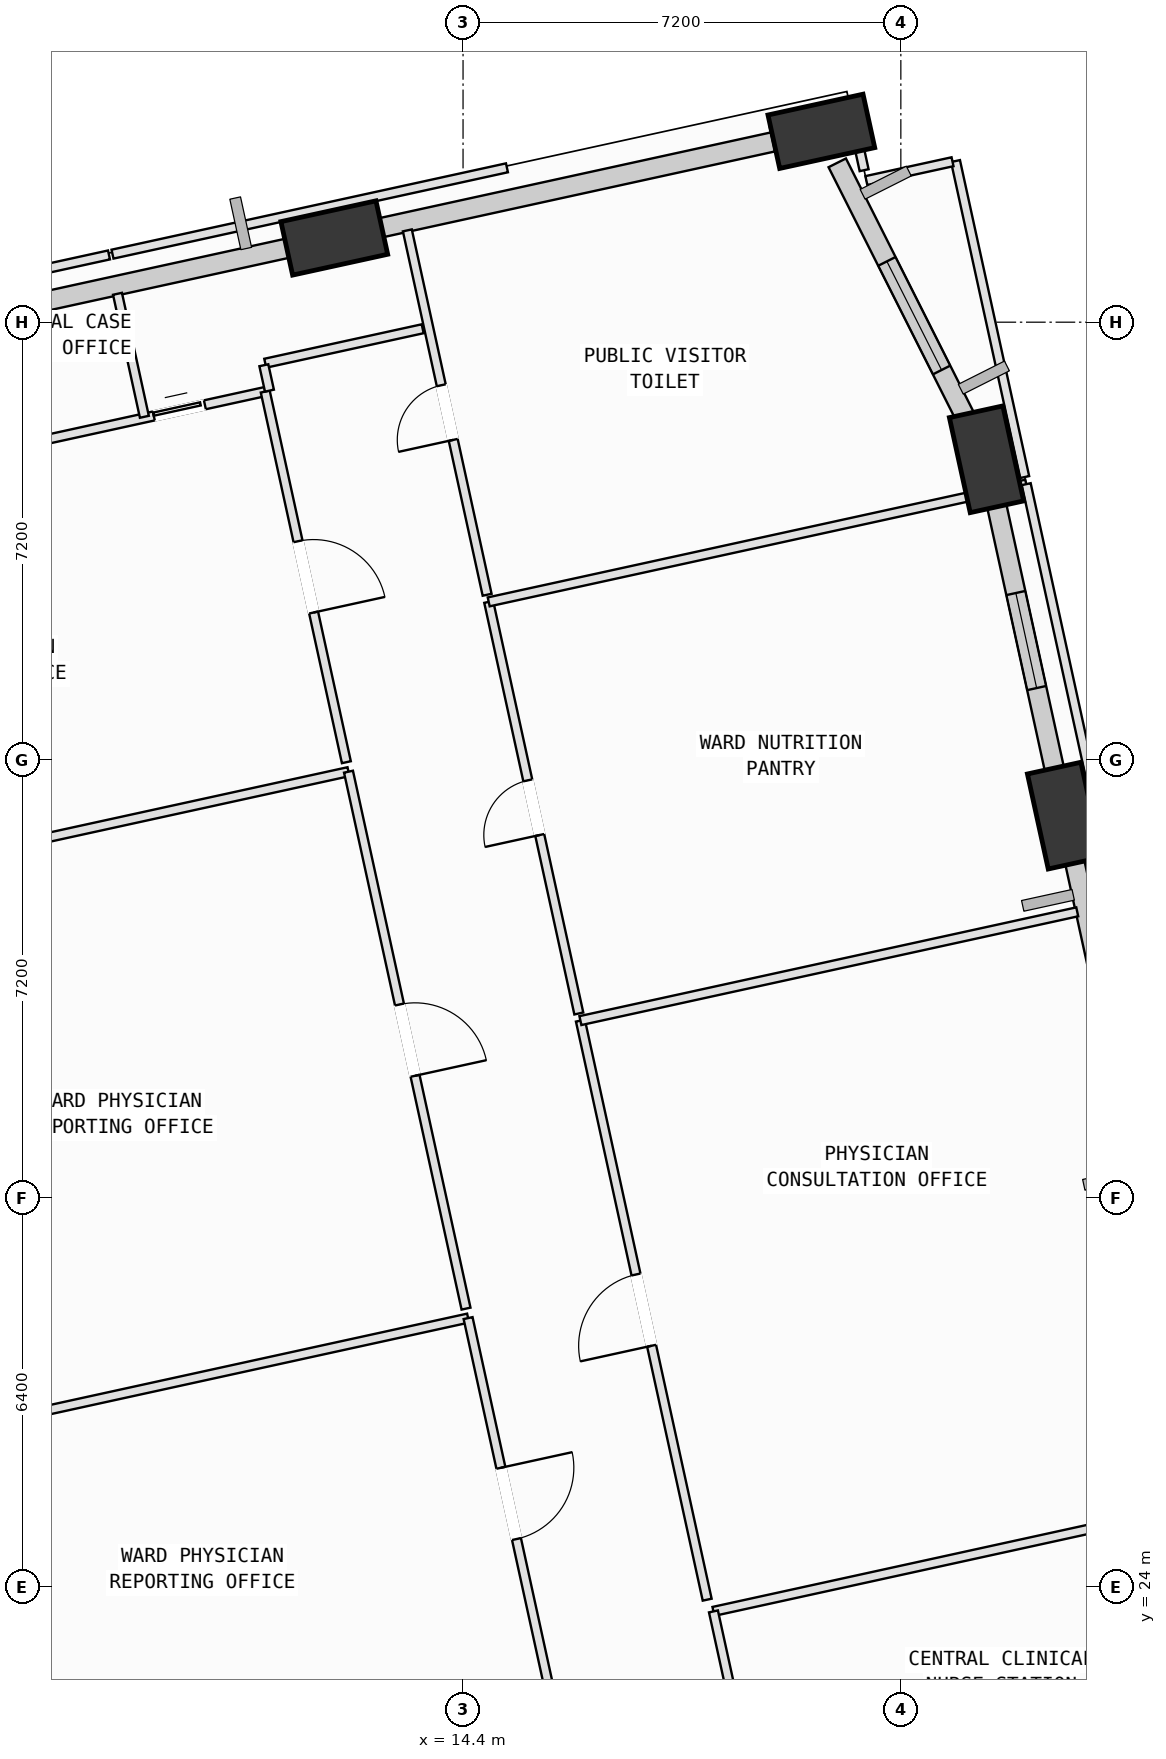
"""IFC4 building model, lengths in metres.
Left out: names, types, materials, properties, quantities, classifications, styles, units other than length and angle.
Written with IfcOpenShell. Run it as: python <this file> out.ifc"""

import sys

from ifc_helpers import new_model, si_unit, direction, frame, frame_2d, origin, origin_2d, place, context, subcontext, project, spatial, rectangle, extrude, element, fill, save


model = new_model("IFC4")
c1 = context("Model", 3, precision=1e-05, world=origin(), true_north=direction((0.0, 1.0)))
c2 = subcontext(c1, "Body", "Model", "MODEL_VIEW")
j1 = project(units=[si_unit("LENGTHUNIT", "METRE"), si_unit("PLANEANGLEUNIT", "RADIAN")], contexts=[c1])
p1 = place(None, origin())
s1 = spatial("IfcSite", under=j1, at=p1, CompositionType="ELEMENT")
p2 = place(p1, origin())
s2 = spatial("IfcBuilding", under=s1, at=p2, CompositionType="ELEMENT")
p3 = place(p2, frame((0.0, 0.0, 75.0)))
s3 = spatial("IfcBuildingStorey", under=s2, at=p3, CompositionType="ELEMENT", Elevation=75.0)
p4 = place(p3, frame((24.293, 36.684, 0.002), z_axis=(-0.04883551322, -0.038897699668, 0.998049127853), x_axis=(0.629354777465, 0.774721201746, 0.060988717377)))
e1 = element("IfcColumn", 1, at=p4, inside=s3, PredefinedType="COLUMN", context=c2, shape_type="SweptSolid", body=[
    extrude(rectangle(XDim=1.6, YDim=0.9, at=origin_2d()), origin(), (0.0, 0.0, 1.0), 4.004),
])
p5 = place(p3, frame((23.009, 42.545, 0.002), z_axis=(-0.072915778442, -0.04430942129, 0.99635333313), x_axis=(0.720691851355, 0.688226889689, 0.083348687454)))
e2 = element("IfcColumn", 2, at=p5, inside=s3, PredefinedType="COLUMN", context=c2, shape_type="SweptSolid", body=[
    extrude(rectangle(XDim=1.6, YDim=0.9, at=origin_2d()), origin(), (0.0, 0.0, 1.0), 4.011),
])
p6 = place(p3, frame((20.293, 47.939, 0.002), z_axis=(-0.094839992948, -0.05561679484, 0.993937698183), x_axis=(0.677535355313, -0.735114190103, 0.023515310132)))
e3 = element("IfcColumn", 3, at=p6, inside=s3, PredefinedType="COLUMN", context=c2, shape_type="SweptSolid", body=[
    extrude(rectangle(XDim=1.6, YDim=0.9, at=origin_2d()), origin(), (0.0, 0.0, 1.0), 4.021),
])
p7 = place(p3, frame((12.282, 46.185, 0.002), z_axis=(-0.087224395165, -0.088376072377, 0.992260840061), x_axis=(0.844339325102, -0.535150235142, 0.026558048014)))
e4 = element("IfcColumn", 4, at=p7, inside=s3, PredefinedType="COLUMN", context=c2, shape_type="SweptSolid", body=[
    extrude(rectangle(XDim=1.6, YDim=0.9, at=origin_2d()), origin(), (0.0, 0.0, 1.0), 4.028),
])
p8 = place(p3, frame((25.715, 30.189, 0.0), z_axis=(0.0, 0.0, 1.0), x_axis=(-0.213872937765, 0.976861487874, 0.0)))
e5 = element("IfcWall", 5, at=p8, inside=s3, PredefinedType="SOLIDWALL", context=c2, shape_type="SweptSolid", body=[
    extrude(rectangle(XDim=5.996, YDim=0.32, at=frame_2d((2.998, 0.0))), origin(), (0.0, 0.0, 1.0), 3.165),
])
p9 = place(p8, frame((1.825, 0.0, 0.75)))
e6 = element("IfcOpeningElement", 6, at=p9, cuts=e5, PredefinedType="OPENING", context=c2, shape_type="SweptSolid", body=[
    extrude(rectangle(XDim=1.2, YDim=1.75, at=frame_2d((0.6, 0.875))), frame((0.0, 0.17, 0.0), z_axis=(0.0, -1.0, 0.0), x_axis=(1.0, 0.0, 0.0)), (0.0, 0.0, 1.0), 0.34),
])
p10 = place(p3, frame((24.177, 37.214, 0.0), z_axis=(0.0, 0.0, 1.0), x_axis=(-0.213875270502, 0.976860977145, 0.0)))
e7 = element("IfcWall", 7, at=p10, inside=s3, PredefinedType="SOLIDWALL", context=c2, shape_type="SweptSolid", body=[
    extrude(rectangle(XDim=4.816, YDim=0.32, at=frame_2d((2.408, 0.0))), origin(), (0.0, 0.0, 1.0), 3.165),
])
p11 = place(p10, frame((1.606, 0.0, 0.75)))
e8 = element("IfcOpeningElement", 8, at=p11, cuts=e7, PredefinedType="OPENING", context=c2, shape_type="SweptSolid", body=[
    extrude(rectangle(XDim=1.6, YDim=1.95, at=frame_2d((0.8, 0.975))), frame((0.0, 0.17, 0.0), z_axis=(0.0, -1.0, 0.0), x_axis=(1.0, 0.0, 0.0)), (0.0, 0.0, 1.0), 0.34),
])
p12 = place(p3, frame((20.554, 47.421, 0.0), z_axis=(0.0, 0.0, 1.0), x_axis=(0.449828356425, -0.89311502605, 0.0)))
e9 = element("IfcWall", 9, at=p12, inside=s3, PredefinedType="SOLIDWALL", context=c2, shape_type="SweptSolid", body=[
    extrude(rectangle(XDim=4.889, YDim=0.32, at=frame_2d((2.444, 0.0))), origin(), (0.0, 0.0, 1.0), 3.165),
])
p13 = place(p12, frame((1.815, 0.0, 0.75)))
e10 = element("IfcOpeningElement", 10, at=p13, cuts=e9, PredefinedType="OPENING", context=c2, shape_type="SweptSolid", body=[
    extrude(rectangle(XDim=2.0, YDim=1.95, at=frame_2d((1.0, 0.975))), frame((0.0, 0.17, 0.0), z_axis=(0.0, -1.0, 0.0), x_axis=(1.0, 0.0, 0.0)), (0.0, 0.0, 1.0), 0.34),
])
p14 = place(p3, frame((12.656, 46.267, 0.0), z_axis=(0.0, 0.0, 1.0), x_axis=(0.976859060718, 0.213884023465, 0.0)))
e11 = element("IfcWall", 11, at=p14, inside=s3, PredefinedType="SOLIDWALL", context=c2, shape_type="SweptSolid", body=[
    extrude(rectangle(XDim=7.003, YDim=0.32, at=frame_2d((3.501, 0.0))), origin(), (0.0, 0.0, 1.0), 3.165),
])
p15 = place(p3, frame((4.627, 44.509, 0.0), z_axis=(0.0, 0.0, 1.0), x_axis=(0.976857659369, 0.213890423658, 0.0)))
e12 = element("IfcWall", 12, at=p15, inside=s3, PredefinedType="SOLIDWALL", context=c2, shape_type="SweptSolid", body=[
    extrude(rectangle(XDim=7.035, YDim=0.32, at=frame_2d((3.517, 0.0))), origin(), (0.0, 0.0, 1.0), 3.165),
])
p16 = place(p3, frame((5.286, 26.406, 0.0), z_axis=(0.0, 0.0, 1.0), x_axis=(0.976854150105, 0.213906450166, 0.0)))
e13 = element("IfcWall", 13, at=p16, inside=s3, PredefinedType="PARTITIONING", context=c2, shape_type="SweptSolid", body=[
    extrude(rectangle(XDim=9.415, YDim=0.15, at=frame_2d((4.708, 0.0))), origin(), (0.0, 0.0, 1.0), 3.78),
])
p17 = place(p3, frame((14.483, 28.42, 0.0), z_axis=(0.0, 0.0, 1.0), x_axis=(0.213959387343, -0.976842556694, 0.0)))
e14 = element("IfcWall", 14, at=p17, inside=s3, PredefinedType="PARTITIONING", context=c2, shape_type="SweptSolid", body=[
    extrude(rectangle(XDim=6.24, YDim=0.15, at=frame_2d((3.12, 0.0))), origin(), (0.0, 0.0, 1.0), 3.78),
])
p18 = place(p17, frame((2.52, 0.0, 0.0)))
e15 = element("IfcOpeningElement", 15, at=p18, cuts=e14, PredefinedType="OPENING", context=c2, shape_type="SweptSolid", body=[
    extrude(rectangle(XDim=1.2, YDim=2.15, at=frame_2d((0.6, 1.075))), frame((0.0, 0.085, 0.0), z_axis=(0.0, -1.0, 0.0), x_axis=(1.0, 0.0, 0.0)), (0.0, 0.0, 1.0), 0.17),
])
p19 = place(p3, frame((3.319, 35.393, 0.0), z_axis=(0.0, 0.0, 1.0), x_axis=(0.976854150105, 0.213906450166, 0.0)))
e16 = element("IfcWall", 16, at=p19, inside=s3, PredefinedType="PARTITIONING", context=c2, shape_type="SweptSolid", body=[
    extrude(rectangle(XDim=9.415, YDim=0.15, at=frame_2d((4.708, 0.0))), origin(), (0.0, 0.0, 1.0), 3.78),
])
p20 = place(p3, frame((12.516, 37.407, 0.0), z_axis=(0.0, 0.0, 1.0), x_axis=(0.213809634747, -0.976875345215, 0.0)))
e17 = element("IfcWall", 17, at=p20, inside=s3, PredefinedType="PARTITIONING", context=c2, shape_type="SweptSolid", body=[
    extrude(rectangle(XDim=9.04, YDim=0.15, at=frame_2d((4.52, 0.0))), origin(), (0.0, 0.0, 1.0), 2.865),
])
p21 = place(p20, frame((3.92, 0.0, 0.0)))
e18 = element("IfcOpeningElement", 18, at=p21, cuts=e17, PredefinedType="OPENING", context=c2, shape_type="SweptSolid", body=[
    extrude(rectangle(XDim=1.2, YDim=2.15, at=frame_2d((0.6, 1.075))), frame((0.0, 0.085, 0.0), z_axis=(0.0, -1.0, 0.0), x_axis=(1.0, 0.0, 0.0)), (0.0, 0.0, 1.0), 0.17),
])
p22 = place(p3, frame((3.222, 41.924, 0.0), z_axis=(0.0, 0.0, 1.0), x_axis=(0.976867612807, 0.213844960309, 0.0)))
e19 = element("IfcWall", 19, at=p22, inside=s3, PredefinedType="PARTITIONING", context=c2, shape_type="SweptSolid", body=[
    extrude(rectangle(XDim=8.113, YDim=0.15, at=frame_2d((4.056, 0.0))), origin(), (0.0, 0.0, 1.0), 3.78),
])
p23 = place(p22, frame((3.626, 0.0, 0.0)))
e20 = element("IfcOpeningElement", 20, at=p23, cuts=e19, PredefinedType="OPENING", context=c2, shape_type="SweptSolid", body=[
    extrude(rectangle(XDim=0.86, YDim=2.06, at=frame_2d((0.43, 1.03))), frame((0.0, 0.085, 0.0), z_axis=(0.0, -1.0, 0.0), x_axis=(1.0, 0.0, 0.0)), (0.0, 0.0, 1.0), 0.17),
])
p24 = place(p22, frame((6.237, 0.0, 0.0)))
e21 = element("IfcOpeningElement", 21, at=p24, cuts=e19, PredefinedType="OPENING", context=c2, shape_type="SweptSolid", body=[
    extrude(rectangle(XDim=0.86, YDim=2.06, at=frame_2d((0.43, 1.03))), frame((0.0, 0.085, 0.0), z_axis=(0.0, -1.0, 0.0), x_axis=(1.0, 0.0, 0.0)), (0.0, 0.0, 1.0), 0.17),
])
p25 = place(p3, frame((11.147, 43.659, 0.0), z_axis=(0.0, 0.0, 1.0), x_axis=(0.213772719363, -0.97688342419, 0.0)))
e22 = element("IfcWall", 22, at=p25, inside=s3, PredefinedType="PARTITIONING", context=c2, shape_type="SweptSolid", body=[
    extrude(rectangle(XDim=6.24, YDim=0.15, at=frame_2d((3.12, 0.0))), origin(), (0.0, 0.0, 1.0), 2.865),
])
p26 = place(p25, frame((2.52, 0.0, 0.0)))
e23 = element("IfcOpeningElement", 23, at=p26, cuts=e22, PredefinedType="OPENING", context=c2, shape_type="SweptSolid", body=[
    extrude(rectangle(XDim=1.2, YDim=2.15, at=frame_2d((0.6, 1.075))), frame((0.0, 0.085, 0.0), z_axis=(0.0, -1.0, 0.0), x_axis=(1.0, 0.0, 0.0)), (0.0, 0.0, 1.0), 0.17),
])
p27 = place(p3, frame((18.518, 23.596, 0.0), z_axis=(0.0, 0.0, 1.0), x_axis=(0.97684033918, 0.213969511266, 0.0)))
e24 = element("IfcWall", 24, at=p27, inside=s3, PredefinedType="PARTITIONING", context=c2, shape_type="SweptSolid", body=[
    extrude(rectangle(XDim=8.305, YDim=0.15, at=frame_2d((4.153, 0.0))), origin(), (0.0, 0.0, 1.0), 3.78),
])
p28 = place(p3, frame((19.179, 20.58, 0.0), z_axis=(0.0, 0.0, 1.0), x_axis=(-0.214057678947, 0.976821022544, 0.0)))
e25 = element("IfcWall", 25, at=p28, inside=s3, PredefinedType="PARTITIONING", context=c2, shape_type="SweptSolid", body=[
    extrude(rectangle(XDim=3.087, YDim=0.15, at=frame_2d((1.544, 0.0))), origin(), (0.0, 0.0, 1.0), 3.78),
])
p29 = place(p3, frame((18.415, 23.789, 0.0), z_axis=(0.0, 0.0, 1.0), x_axis=(-0.213853705806, 0.976865698299, 0.0)))
e26 = element("IfcWall", 26, at=p29, inside=s3, PredefinedType="PARTITIONING", context=c2, shape_type="SweptSolid", body=[
    extrude(rectangle(XDim=9.75, YDim=0.15, at=frame_2d((4.875, 0.0))), origin(), (0.0, 0.0, 1.0), 3.78),
])
p30 = place(p29, frame((4.275, 0.0, 0.0)))
e27 = element("IfcOpeningElement", 27, at=p30, cuts=e26, PredefinedType="OPENING", context=c2, shape_type="SweptSolid", body=[
    extrude(rectangle(XDim=1.2, YDim=2.15, at=frame_2d((0.6, 1.075))), frame((0.0, 0.085, 0.0), z_axis=(0.0, -1.0, 0.0), x_axis=(1.0, 0.0, 0.0)), (0.0, 0.0, 1.0), 0.17),
])
p31 = place(p3, frame((16.33, 33.313, 0.0), z_axis=(0.0, 0.0, 1.0), x_axis=(0.976858107434, 0.213888377294, 0.0)))
e28 = element("IfcWall", 28, at=p31, inside=s3, PredefinedType="PARTITIONING", context=c2, shape_type="SweptSolid", body=[
    extrude(rectangle(XDim=8.365, YDim=0.15, at=frame_2d((4.182, 0.0))), origin(), (0.0, 0.0, 1.0), 3.78),
])
p32 = place(p3, frame((16.304, 33.43, 0.0), z_axis=(0.0, 0.0, 1.0), x_axis=(-0.213833454661, 0.976870131424, 0.0)))
e29 = element("IfcWall", 29, at=p32, inside=s3, PredefinedType="PARTITIONING", context=c2, shape_type="SweptSolid", body=[
    extrude(rectangle(XDim=6.93, YDim=0.15, at=frame_2d((3.465, 0.0))), origin(), (0.0, 0.0, 1.0), 3.78),
])
p33 = place(p32, frame((3.005, 0.0, 0.0)))
e30 = element("IfcOpeningElement", 30, at=p33, cuts=e29, PredefinedType="OPENING", context=c2, shape_type="SweptSolid", body=[
    extrude(rectangle(XDim=0.92, YDim=2.1, at=frame_2d((0.46, 1.05))), frame((0.0, 0.085, 0.0), z_axis=(0.0, -1.0, 0.0), x_axis=(1.0, 0.0, 0.0)), (0.0, 0.0, 1.0), 0.17),
])
p34 = place(p3, frame((14.822, 40.2, 0.0), z_axis=(0.0, 0.0, 1.0), x_axis=(0.976860427396, 0.213877781427, 0.0)))
e31 = element("IfcWall", 31, at=p34, inside=s3, PredefinedType="PARTITIONING", context=c2, shape_type="SweptSolid", body=[
    extrude(rectangle(XDim=8.412, YDim=0.15, at=frame_2d((4.206, 0.0))), origin(), (0.0, 0.0, 1.0), 3.78),
])
p35 = place(p3, frame((23.211, 42.037, 0.0), z_axis=(0.0, 0.0, 1.0), x_axis=(0.97681718406, 0.214075194559, 0.0)))
e32 = element("IfcWall", 32, at=p35, inside=s3, PredefinedType="PARTITIONING", context=c2, shape_type="SweptSolid", body=[
    extrude(rectangle(XDim=0.462, YDim=0.15, at=frame_2d((0.231, 0.0))), origin(), (0.0, 0.0, 1.0), 3.78),
])
p36 = place(p3, frame((23.662, 42.136, 0.0), z_axis=(0.0, 0.0, 1.0), x_axis=(0.213833454661, -0.976870131424, 0.0)))
e33 = element("IfcWall", 33, at=p36, inside=s3, PredefinedType="PARTITIONING", context=c2, shape_type="SweptSolid", body=[
    extrude(rectangle(XDim=6.93, YDim=0.15, at=frame_2d((3.465, 0.0))), origin(), (0.0, 0.0, 1.0), 3.78),
])
p37 = place(p3, frame((22.499, 47.45, 0.0), z_axis=(0.0, 0.0, 1.0), x_axis=(0.213892579963, -0.976857187227, 0.0)))
e34 = element("IfcWall", 34, at=p37, inside=s3, PredefinedType="PARTITIONING", context=c2, shape_type="SweptSolid", body=[
    extrude(rectangle(XDim=5.32, YDim=0.15, at=frame_2d((2.66, 0.0))), origin(), (0.0, 0.0, 1.0), 3.78),
])
p38 = place(p3, frame((14.796, 40.317, 0.0), z_axis=(0.0, 0.0, 1.0), x_axis=(-0.213853530585, 0.976865736658, 0.0)))
e35 = element("IfcWall", 35, at=p38, inside=s3, PredefinedType="PARTITIONING", context=c2, shape_type="SweptSolid", body=[
    extrude(rectangle(XDim=6.135, YDim=0.15, at=frame_2d((3.067, 0.0))), origin(), (0.0, 0.0, 1.0), 3.78),
])
p39 = place(p38, frame((2.607, 0.0, 0.0)))
e36 = element("IfcOpeningElement", 36, at=p39, cuts=e35, PredefinedType="OPENING", context=c2, shape_type="SweptSolid", body=[
    extrude(rectangle(XDim=0.92, YDim=2.1, at=frame_2d((0.46, 1.05))), frame((0.0, 0.085, 0.0), z_axis=(0.0, -1.0, 0.0), x_axis=(1.0, 0.0, 0.0)), (0.0, 0.0, 1.0), 0.17),
])
p40 = place(p3, frame((19.457, 47.951, 0.0), z_axis=(0.0, 0.0, 1.0), x_axis=(0.976839285901, 0.213974319769, 0.0)))
e37 = element("IfcWall", 37, at=p40, inside=s3, PredefinedType="PARTITIONING", context=c2, shape_type="SweptSolid", body=[
    extrude(rectangle(XDim=1.365, YDim=0.15, at=frame_2d((0.682, 0.0))), origin(), (0.0, 0.0, 1.0), 3.165),
])
p41 = place(p3, frame((20.801, 48.194, 0.0), z_axis=(0.0, 0.0, 1.0), x_axis=(0.213171705665, -0.977014751119, 0.0)))
e38 = element("IfcWall", 38, at=p41, inside=s3, PredefinedType="PARTITIONING", context=c2, shape_type="SweptSolid", body=[
    extrude(rectangle(XDim=0.915, YDim=0.15, at=frame_2d((0.458, 0.0))), origin(), (0.0, 0.0, 1.0), 3.78),
])
p42 = place(p3, frame((21.033, 47.129, 0.0), z_axis=(0.0, 0.0, 1.0), x_axis=(0.97688683915, 0.213757113322, 0.0)))
e39 = element("IfcWall", 39, at=p42, inside=s3, PredefinedType="PARTITIONING", context=c2, shape_type="SweptSolid", body=[
    extrude(rectangle(XDim=1.45, YDim=0.15, at=frame_2d((0.725, 0.0))), origin(), (0.0, 0.0, 1.0), 3.78),
])
p43 = place(p3, frame((3.624, 44.822, 0.0), z_axis=(0.0, 0.0, 1.0), x_axis=(0.976877708266, 0.213798837911, 0.0)))
e40 = element("IfcWall", 40, at=p43, inside=s3, PredefinedType="PARTITIONING", context=c2, shape_type="SweptSolid", body=[
    extrude(rectangle(XDim=5.07, YDim=0.15, at=frame_2d((2.535, 0.0))), origin(), (0.0, 0.0, 1.0), 3.78),
])
p44 = place(p3, frame((8.717, 45.267, 0.0), z_axis=(0.0, 0.0, 1.0), x_axis=(0.213383954957, -0.976968416975, 0.0)))
e41 = element("IfcWall", 41, at=p44, inside=s3, PredefinedType="PARTITIONING", context=c2, shape_type="SweptSolid", body=[
    extrude(rectangle(XDim=2.071, YDim=0.15, at=frame_2d((1.035, 0.0))), origin(), (0.0, 0.0, 1.0), 3.78),
])
p45 = place(p3, frame((8.635, 45.919, 0.0), z_axis=(0.0, 0.0, 1.0), x_axis=(0.976864747358, 0.21385804958, 0.0)))
e42 = element("IfcWall", 42, at=p45, inside=s3, PredefinedType="PARTITIONING", context=c2, shape_type="SweptSolid", body=[
    extrude(rectangle(XDim=6.641, YDim=0.15, at=frame_2d((3.32, 0.0))), origin(), (0.0, 0.0, 1.0), 3.78),
])
p46 = place(p3, frame((13.736, 44.692, 0.0), z_axis=(0.0, 0.0, 1.0), x_axis=(-0.976858535273, -0.213886423282, 0.0)))
e43 = element("IfcWall", 43, at=p46, inside=s3, PredefinedType="PARTITIONING", context=c2, shape_type="SweptSolid", body=[
    extrude(rectangle(XDim=2.65, YDim=0.15, at=frame_2d((1.325, 0.0))), origin(), (0.0, 0.0, 1.0), 3.78),
])
p47 = place(p3, frame((11.124, 44.092, 0.0), z_axis=(0.0, 0.0, 1.0), x_axis=(0.215057657882, -0.976601353566, 0.0)))
e44 = element("IfcWall", 44, at=p47, inside=s3, PredefinedType="PARTITIONING", context=c2, shape_type="SweptSolid", body=[
    extrude(rectangle(XDim=0.428, YDim=0.15, at=frame_2d((0.214, 0.0))), origin(), (0.0, 0.0, 1.0), 3.78),
])
p48 = place(p11, origin())
e45 = element("IfcWindow", 45, at=p48, inside=s3, PartitioningType="SINGLE_PANEL", PredefinedType="WINDOW", context=c2, shape_type="SweptSolid", body=[
    extrude(rectangle(XDim=1.6, YDim=1.95, at=frame_2d((0.8, 0.975))), frame((0.0, 0.03, 0.0), z_axis=(0.0, -1.0, 0.0), x_axis=(1.0, 0.0, 0.0)), (0.0, 0.0, 1.0), 0.06),
])
fill(e8, e45)
p49 = place(p13, origin())
e46 = element("IfcWindow", 46, at=p49, inside=s3, PartitioningType="SINGLE_PANEL", PredefinedType="WINDOW", context=c2, shape_type="SweptSolid", body=[
    extrude(rectangle(XDim=2.0, YDim=1.95, at=frame_2d((1.0, 0.975))), frame((0.0, 0.03, 0.0), z_axis=(0.0, -1.0, 0.0), x_axis=(1.0, 0.0, 0.0)), (0.0, 0.0, 1.0), 0.06),
])
fill(e10, e46)
p50 = place(p18, origin())
e47 = element("IfcDoor", 47, at=p50, inside=s3, OperationType="SINGLE_SWING_LEFT", PredefinedType="DOOR", context=c2, shape_type="SweptSolid", body=[
    extrude(rectangle(XDim=1.2, YDim=2.15, at=frame_2d((0.6, 1.075))), frame((0.0, 0.025, 0.0), z_axis=(0.0, -1.0, 0.0), x_axis=(1.0, 0.0, 0.0)), (0.0, 0.0, 1.0), 0.05),
])
fill(e15, e47)
p51 = place(p21, origin())
e48 = element("IfcDoor", 48, at=p51, inside=s3, OperationType="SINGLE_SWING_RIGHT", PredefinedType="DOOR", context=c2, shape_type="SweptSolid", body=[
    extrude(rectangle(XDim=1.2, YDim=2.15, at=frame_2d((0.6, 1.075))), frame((0.0, 0.025, 0.0), z_axis=(0.0, -1.0, 0.0), x_axis=(1.0, 0.0, 0.0)), (0.0, 0.0, 1.0), 0.05),
])
fill(e18, e48)
p52 = place(p26, origin())
e49 = element("IfcDoor", 49, at=p52, inside=s3, OperationType="SINGLE_SWING_RIGHT", PredefinedType="DOOR", context=c2, shape_type="SweptSolid", body=[
    extrude(rectangle(XDim=1.2, YDim=2.15, at=frame_2d((0.6, 1.075))), frame((0.0, 0.025, 0.0), z_axis=(0.0, -1.0, 0.0), x_axis=(1.0, 0.0, 0.0)), (0.0, 0.0, 1.0), 0.05),
])
fill(e23, e49)
p53 = place(p30, origin())
e50 = element("IfcDoor", 50, at=p53, inside=s3, OperationType="SINGLE_SWING_LEFT", PredefinedType="DOOR", context=c2, shape_type="SweptSolid", body=[
    extrude(rectangle(XDim=1.2, YDim=2.15, at=frame_2d((0.6, 1.075))), frame((0.0, 0.025, 0.0), z_axis=(0.0, -1.0, 0.0), x_axis=(1.0, 0.0, 0.0)), (0.0, 0.0, 1.0), 0.05),
])
fill(e27, e50)
p54 = place(p33, origin())
e51 = element("IfcDoor", 51, at=p54, inside=s3, OperationType="SINGLE_SWING_LEFT", PredefinedType="DOOR", context=c2, shape_type="SweptSolid", body=[
    extrude(rectangle(XDim=0.92, YDim=2.1, at=frame_2d((0.46, 1.05))), frame((0.0, 0.025, 0.0), z_axis=(0.0, -1.0, 0.0), x_axis=(1.0, 0.0, 0.0)), (0.0, 0.0, 1.0), 0.05),
])
fill(e30, e51)
p55 = place(p39, origin())
e52 = element("IfcDoor", 52, at=p55, inside=s3, OperationType="SINGLE_SWING_LEFT", PredefinedType="DOOR", context=c2, shape_type="SweptSolid", body=[
    extrude(rectangle(XDim=0.92, YDim=2.1, at=frame_2d((0.46, 1.05))), frame((0.0, 0.025, 0.0), z_axis=(0.0, -1.0, 0.0), x_axis=(1.0, 0.0, 0.0)), (0.0, 0.0, 1.0), 0.05),
])
fill(e36, e52)
p56 = place(p24, origin())
e53 = element("IfcDoor", 53, at=p56, inside=s3, OperationType="SLIDING_TO_LEFT", PredefinedType="DOOR", context=c2, shape_type="SweptSolid", body=[
    extrude(rectangle(XDim=0.86, YDim=2.06, at=frame_2d((0.43, 1.03))), frame((0.0, 0.025, 0.0), z_axis=(0.0, -1.0, 0.0), x_axis=(1.0, 0.0, 0.0)), (0.0, 0.0, 1.0), 0.05),
])
fill(e21, e53)
save(model, sys.argv[1])
